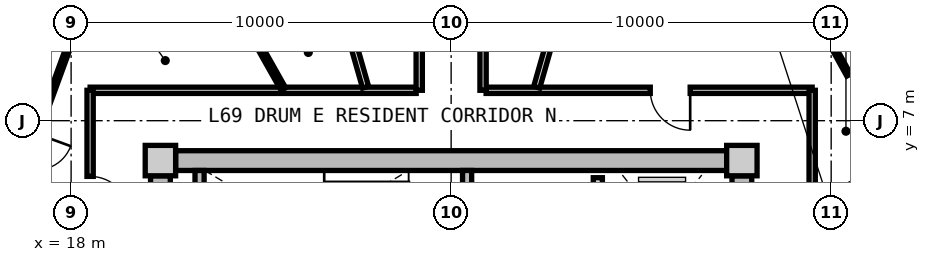
"""IFC4 building model, lengths in metres.
Left out: names, types, materials, properties, quantities, classifications, styles, units other than length and angle.
Written with IfcOpenShell. Run it as: python <this file> out.ifc"""

import sys

from ifc_helpers import new_model, si_unit, direction, frame, frame_2d, origin, origin_2d, place, context, subcontext, project, spatial, rectangle, extrude, source, transform, mapped, element, fill, save


model = new_model("IFC4")
c1 = context("Model", 3, precision=1e-05, world=origin(), true_north=direction((0.0, 1.0)))
c2 = subcontext(c1, "Body", "Model", "MODEL_VIEW")
j1 = project(units=[si_unit("LENGTHUNIT", "METRE"), si_unit("PLANEANGLEUNIT", "RADIAN")], contexts=[c1])
p1 = place(None, origin())
s1 = spatial("IfcSite", under=j1, at=p1, CompositionType="ELEMENT")
p2 = place(p1, origin())
s2 = spatial("IfcBuilding", under=s1, at=p2, CompositionType="ELEMENT")
p3 = place(p2, frame((0.0, 0.0, 223.05)))
s3 = spatial("IfcBuildingStorey", under=s2, at=p3, CompositionType="ELEMENT", Elevation=223.05)
m1 = source(origin(), c2, "Body", "SweptSolid", [
    extrude(rectangle(XDim=0.8, YDim=0.8, at=origin_2d()), origin(), (0.0, 0.0, 1.0), 3.05),
])
for number, where, z_axis, x_axis in (
    (1, (35.65, 5.95, 0.0), (0.0, 0.0, 1.0), (1.0, 0.0, 0.0)),
    (2, (20.35, 5.95, 0.0), (0.0, 0.0, 1.0), (1.0, 0.0, 0.0)),
):
    element("IfcColumn", number, at=place(p3, frame(where, z_axis=z_axis, x_axis=x_axis)), inside=s3, PredefinedType="COLUMN", context=c2, shape_type="MappedRepresentation", body=[
        mapped(m1, transform((0.0, 0.0, 0.0), x_axis=(1.0, 0.0, 0.0), y_axis=(0.0, 1.0, 0.0), z_axis=(0.0, 0.0, 1.0), scale=1.0)),
    ])
m2 = source(origin(), c2, "Body", "SweptSolid", [
    extrude(rectangle(XDim=14.5, YDim=0.52, at=frame_2d((7.25, 0.0))), origin(), (0.0, 0.0, 1.0), 2.76),
])
p4 = place(p3, frame((20.75, 5.95, 0.0), z_axis=(0.0, 0.0, 1.0), x_axis=(1.0, 0.0, 0.0)))
e3 = element("IfcWall", 3, at=p4, inside=s3, PredefinedType="SHEAR", context=c2, shape_type="MappedRepresentation", body=[
    mapped(m2, transform((0.0, 0.0, 0.0), x_axis=(1.0, 0.0, 0.0), y_axis=(0.0, 1.0, 0.0), z_axis=(0.0, 0.0, 1.0), scale=1.0)),
])
m3 = source(origin(), c2, "Body", "SweptSolid", [
    extrude(rectangle(XDim=11.1, YDim=0.52, at=frame_2d((5.55, 0.0))), origin(), (0.0, 0.0, 1.0), 2.76),
])
p5 = place(p3, frame((20.35, -5.55, 0.0), z_axis=(0.0, 0.0, 1.0), x_axis=(0.0, 1.0, 0.0)))
e4 = element("IfcWall", 4, at=p5, inside=s3, PredefinedType="SHEAR", context=c2, shape_type="MappedRepresentation", body=[
    mapped(m3, transform((0.0, 0.0, 0.0), x_axis=(1.0, 0.0, 0.0), y_axis=(0.0, 1.0, 0.0), z_axis=(0.0, 0.0, 1.0), scale=1.0)),
])
p6 = place(p5, frame((3.8, 0.0, 0.0)))
e5 = element("IfcOpeningElement", 5, at=p6, cuts=e4, PredefinedType="OPENING", context=c2, shape_type="SweptSolid", body=[
    extrude(rectangle(XDim=1.2, YDim=2.15, at=frame_2d((0.6, 1.075))), frame((0.0, 0.27, 0.0), z_axis=(0.0, -1.0, 0.0), x_axis=(1.0, 0.0, 0.0)), (0.0, 0.0, 1.0), 0.54),
])
p7 = place(p3, frame((35.65, 5.55, 0.0), z_axis=(0.0, 0.0, 1.0), x_axis=(0.0, -1.0, 0.0)))
e6 = element("IfcWall", 6, at=p7, inside=s3, PredefinedType="SHEAR", context=c2, shape_type="MappedRepresentation", body=[
    mapped(m3, transform((0.0, 0.0, 0.0), x_axis=(1.0, 0.0, 0.0), y_axis=(0.0, 1.0, 0.0), z_axis=(0.0, 0.0, 1.0), scale=1.0)),
])
p8 = place(p7, frame((5.65, 0.0, 0.0)))
e7 = element("IfcOpeningElement", 7, at=p8, cuts=e6, PredefinedType="OPENING", context=c2, shape_type="SweptSolid", body=[
    extrude(rectangle(XDim=1.2, YDim=2.15, at=frame_2d((0.6, 1.075))), frame((0.0, 0.27, 0.0), z_axis=(0.0, -1.0, 0.0), x_axis=(1.0, 0.0, 0.0)), (0.0, 0.0, 1.0), 0.54),
])
m4 = source(origin(), c2, "Body", "SweptSolid", [
    extrude(rectangle(XDim=3.24, YDim=0.24, at=frame_2d((1.62, 0.0))), origin(), (0.0, 0.0, 1.0), 2.76),
])
p9 = place(p3, frame((21.38, 2.45, 0.0), z_axis=(0.0, 0.0, 1.0), x_axis=(0.0, 1.0, 0.0)))
e8 = element("IfcWall", 8, at=p9, inside=s3, PredefinedType="PARTITIONING", context=c2, shape_type="MappedRepresentation", body=[
    mapped(m4, transform((0.0, 0.0, 0.0), x_axis=(1.0, 0.0, 0.0), y_axis=(0.0, 1.0, 0.0), z_axis=(0.0, 0.0, 1.0), scale=1.0)),
])
p10 = place(p3, frame((28.42, 2.45, 0.0), z_axis=(0.0, 0.0, 1.0), x_axis=(0.0, 1.0, 0.0)))
e9 = element("IfcWall", 9, at=p10, inside=s3, PredefinedType="PARTITIONING", context=c2, shape_type="MappedRepresentation", body=[
    mapped(m4, transform((0.0, 0.0, 0.0), x_axis=(1.0, 0.0, 0.0), y_axis=(0.0, 1.0, 0.0), z_axis=(0.0, 0.0, 1.0), scale=1.0)),
])
p11 = place(p10, frame((0.55, 0.0, 0.0)))
e10 = element("IfcOpeningElement", 10, at=p11, cuts=e9, PredefinedType="OPENING", context=c2, shape_type="SweptSolid", body=[
    extrude(rectangle(XDim=1.1, YDim=2.15, at=frame_2d((0.55, 1.075))), frame((0.0, 0.13, 0.0), z_axis=(0.0, -1.0, 0.0), x_axis=(1.0, 0.0, 0.0)), (0.0, 0.0, 1.0), 0.26),
])
m5 = source(origin(), c2, "Body", "SweptSolid", [
    extrude(rectangle(XDim=5.0, YDim=0.24, at=frame_2d((2.5, 0.0))), origin(), (0.0, 0.0, 1.0), 2.745),
])
p12 = place(p3, frame((31.86, 0.5, 0.0), z_axis=(0.0, 0.0, 1.0), x_axis=(0.0, 1.0, 0.0)))
e11 = element("IfcWall", 11, at=p12, inside=s3, PredefinedType="PARTITIONING", context=c2, shape_type="MappedRepresentation", body=[
    mapped(m5, transform((0.0, 0.0, 0.0), x_axis=(1.0, 0.0, 0.0), y_axis=(0.0, 1.0, 0.0), z_axis=(0.0, 0.0, 1.0), scale=1.0)),
])
p13 = place(p12, frame((3.05, 0.0, 0.0)))
e12 = element("IfcOpeningElement", 12, at=p13, cuts=e11, PredefinedType="OPENING", context=c2, shape_type="SweptSolid", body=[
    extrude(rectangle(XDim=1.3, YDim=2.2, at=frame_2d((0.65, 1.1))), frame((0.0, 0.13, 0.0), z_axis=(0.0, -1.0, 0.0), x_axis=(1.0, 0.0, 0.0)), (0.0, 0.0, 1.0), 0.26),
])
p14 = place(p12, frame((0.55, 0.0, 0.0)))
e13 = element("IfcOpeningElement", 13, at=p14, cuts=e11, PredefinedType="OPENING", context=c2, shape_type="SweptSolid", body=[
    extrude(rectangle(XDim=1.3, YDim=2.2, at=frame_2d((0.65, 1.1))), frame((0.0, 0.13, 0.0), z_axis=(0.0, -1.0, 0.0), x_axis=(1.0, 0.0, 0.0)), (0.0, 0.0, 1.0), 0.26),
])
m6 = source(origin(), c2, "Body", "SweptSolid", [
    extrude(rectangle(XDim=8.58, YDim=0.165, at=frame_2d((4.29, 0.0))), origin(), (0.0, 0.0, 1.0), 2.745),
])
p15 = place(p3, frame((18.5, 7.8, 0.0), z_axis=(0.0, 0.0, 1.0), x_axis=(1.0, 0.0, 0.0)))
e14 = element("IfcWall", 14, at=p15, inside=s3, PredefinedType="PARTITIONING", context=c2, shape_type="MappedRepresentation", body=[
    mapped(m6, transform((0.0, 0.0, 0.0), x_axis=(1.0, 0.0, 0.0), y_axis=(0.0, 1.0, 0.0), z_axis=(0.0, 0.0, 1.0), scale=1.0)),
])
p16 = place(p3, frame((28.92, 7.8, 0.0), z_axis=(0.0, 0.0, 1.0), x_axis=(1.0, 0.0, 0.0)))
e15 = element("IfcWall", 15, at=p16, inside=s3, PredefinedType="PARTITIONING", context=c2, shape_type="MappedRepresentation", body=[
    mapped(m6, transform((0.0, 0.0, 0.0), x_axis=(1.0, 0.0, 0.0), y_axis=(0.0, 1.0, 0.0), z_axis=(0.0, 0.0, 1.0), scale=1.0)),
])
p17 = place(p16, frame((4.32, 0.0, 0.0)))
e16 = element("IfcOpeningElement", 16, at=p17, cuts=e15, PredefinedType="OPENING", context=c2, shape_type="SweptSolid", body=[
    extrude(rectangle(XDim=1.05, YDim=2.15, at=frame_2d((0.525, 1.075))), frame((0.0, 0.093, 0.0), z_axis=(0.0, -1.0, 0.0), x_axis=(1.0, 0.0, 0.0)), (0.0, 0.0, 1.0), 0.185),
])
m7 = source(origin(), c2, "Body", "SweptSolid", [
    extrude(rectangle(XDim=6.88, YDim=0.165, at=frame_2d((3.44, 0.0))), origin(), (0.0, 0.0, 1.0), 2.745),
])
p18 = place(p3, frame((18.5, 0.92, 0.0), z_axis=(0.0, 0.0, 1.0), x_axis=(0.0, 1.0, 0.0)))
e17 = element("IfcWall", 17, at=p18, inside=s3, PredefinedType="PARTITIONING", context=c2, shape_type="MappedRepresentation", body=[
    mapped(m7, transform((0.0, 0.0, 0.0), x_axis=(1.0, 0.0, 0.0), y_axis=(0.0, 1.0, 0.0), z_axis=(0.0, 0.0, 1.0), scale=1.0)),
])
p19 = place(p18, frame((3.564, 0.0, 0.0)))
e18 = element("IfcOpeningElement", 18, at=p19, cuts=e17, PredefinedType="OPENING", context=c2, shape_type="SweptSolid", body=[
    extrude(rectangle(XDim=1.05, YDim=2.15, at=frame_2d((0.525, 1.075))), frame((0.0, 0.093, 0.0), z_axis=(0.0, -1.0, 0.0), x_axis=(1.0, 0.0, 0.0)), (0.0, 0.0, 1.0), 0.185),
])
p20 = place(p3, frame((37.5, 7.8, 0.0), z_axis=(0.0, 0.0, 1.0), x_axis=(0.0, -1.0, 0.0)))
e19 = element("IfcWall", 19, at=p20, inside=s3, PredefinedType="PARTITIONING", context=c2, shape_type="MappedRepresentation", body=[
    mapped(m7, transform((0.0, 0.0, 0.0), x_axis=(1.0, 0.0, 0.0), y_axis=(0.0, 1.0, 0.0), z_axis=(0.0, 0.0, 1.0), scale=1.0)),
])
m8 = source(origin(), c2, "Body", "SweptSolid", [
    extrude(rectangle(XDim=6.974, YDim=0.165, at=frame_2d((3.487, 0.0))), origin(), (0.0, 0.0, 1.0), 2.345),
])
for number, where, z_axis, x_axis in (
    (20, (30.251, 7.88, 0.0), (0.0, 0.0, 1.0), (0.275, 0.962, 0.0)),
    (21, (25.749, 7.88, 0.0), (0.0, 0.0, 1.0), (-0.275, 0.962, 0.0)),
):
    element("IfcWall", number, at=place(p3, frame(where, z_axis=z_axis, x_axis=x_axis)), inside=s3, PredefinedType="PARTITIONING", context=c2, shape_type="MappedRepresentation", body=[
        mapped(m8, transform((0.0, 0.0, 0.0), x_axis=(1.0, 0.0, 0.0), y_axis=(0.0, 1.0, 0.0), z_axis=(0.0, 0.0, 1.0), scale=1.0)),
    ])
m9 = source(origin(), c2, "Body", "SweptSolid", [
    extrude(rectangle(XDim=6.835, YDim=0.165, at=frame_2d((3.418, 0.0))), origin(), (0.0, 0.0, 1.0), 2.745),
])
p21 = place(p3, frame((27.16, 7.8, 0.0), z_axis=(0.0, 0.0, 1.0), x_axis=(0.0, 1.0, 0.0)))
e22 = element("IfcWall", 22, at=p21, inside=s3, PredefinedType="PARTITIONING", context=c2, shape_type="MappedRepresentation", body=[
    mapped(m9, transform((0.0, 0.0, 0.0), x_axis=(1.0, 0.0, 0.0), y_axis=(0.0, 1.0, 0.0), z_axis=(0.0, 0.0, 1.0), scale=1.0)),
])
p22 = place(p21, frame((2.943, 0.0, 0.0)))
e23 = element("IfcOpeningElement", 23, at=p22, cuts=e22, PredefinedType="OPENING", context=c2, shape_type="SweptSolid", body=[
    extrude(rectangle(XDim=0.95, YDim=2.1, at=frame_2d((0.475, 1.05))), frame((0.0, 0.093, 0.0), z_axis=(0.0, -1.0, 0.0), x_axis=(1.0, 0.0, 0.0)), (0.0, 0.0, 1.0), 0.185),
])
p23 = place(p3, frame((28.84, 14.635, 0.0), z_axis=(0.0, 0.0, 1.0), x_axis=(0.0, -1.0, 0.0)))
e24 = element("IfcWall", 24, at=p23, inside=s3, PredefinedType="PARTITIONING", context=c2, shape_type="MappedRepresentation", body=[
    mapped(m9, transform((0.0, 0.0, 0.0), x_axis=(1.0, 0.0, 0.0), y_axis=(0.0, 1.0, 0.0), z_axis=(0.0, 0.0, 1.0), scale=1.0)),
])
p24 = place(p23, frame((2.943, 0.0, 0.0)))
e25 = element("IfcOpeningElement", 25, at=p24, cuts=e24, PredefinedType="OPENING", context=c2, shape_type="SweptSolid", body=[
    extrude(rectangle(XDim=0.95, YDim=2.1, at=frame_2d((0.475, 1.05))), frame((0.0, 0.093, 0.0), z_axis=(0.0, -1.0, 0.0), x_axis=(1.0, 0.0, 0.0)), (0.0, 0.0, 1.0), 0.185),
])
m10 = source(origin(), c2, "Body", "SweptSolid", [
    extrude(rectangle(XDim=1.638, YDim=0.14, at=frame_2d((0.819, 0.0))), origin(), (0.0, 0.0, 1.0), 2.745),
])
p25 = place(p3, frame((37.53, 4.778, 0.0), z_axis=(0.0, 0.0, 1.0), x_axis=(0.893919977945, 0.448226586707, 0.0)))
e26 = element("IfcWall", 26, at=p25, inside=s3, PredefinedType="PARTITIONING", context=c2, shape_type="MappedRepresentation", body=[
    mapped(m10, transform((0.0, 0.0, 0.0), x_axis=(1.0, 0.0, 0.0), y_axis=(0.0, 1.0, 0.0), z_axis=(0.0, 0.0, 1.0), scale=1.0)),
])
m11 = source(origin(), c2, "Body", "SweptSolid", [
    extrude(rectangle(XDim=3.45, YDim=0.115, at=frame_2d((1.725, 0.0))), origin(), (0.0, 0.0, 1.0), 2.745),
])
p26 = place(p3, frame((39.525, 6.275, 0.0), z_axis=(0.0, 0.0, 1.0), x_axis=(-0.483659007882, 0.875256513312, 0.0)))
e27 = element("IfcWall", 27, at=p26, inside=s3, PredefinedType="PARTITIONING", context=c2, shape_type="MappedRepresentation", body=[
    mapped(m11, transform((0.0, 0.0, 0.0), x_axis=(1.0, 0.0, 0.0), y_axis=(0.0, 1.0, 0.0), z_axis=(0.0, 0.0, 1.0), scale=1.0)),
])
p27 = place(p26, frame((1.25, 0.0, 0.0)))
e28 = element("IfcOpeningElement", 28, at=p27, cuts=e27, PredefinedType="OPENING", context=c2, shape_type="SweptSolid", body=[
    extrude(rectangle(XDim=0.95, YDim=2.1, at=frame_2d((0.475, 1.05))), frame((0.0, 0.067, 0.0), z_axis=(0.0, -1.0, 0.0), x_axis=(1.0, 0.0, 0.0)), (0.0, 0.0, 1.0), 0.135),
])
m12 = source(origin(), c2, "Body", "SweptSolid", [
    extrude(rectangle(XDim=6.69, YDim=0.115, at=frame_2d((3.345, 0.0))), origin(), (0.0, 0.0, 1.0), 2.745),
])
p28 = place(p3, frame((18.083, 9.352, 0.0), z_axis=(0.0, 0.0, 1.0), x_axis=(-0.343693784919, -0.939081776102, 0.0)))
e29 = element("IfcWall", 29, at=p28, inside=s3, PredefinedType="PARTITIONING", context=c2, shape_type="MappedRepresentation", body=[
    mapped(m12, transform((0.0, 0.0, 0.0), x_axis=(1.0, 0.0, 0.0), y_axis=(0.0, 1.0, 0.0), z_axis=(0.0, 0.0, 1.0), scale=1.0)),
])
p29 = place(p28, frame((2.87, 0.0, 0.0)))
e30 = element("IfcOpeningElement", 30, at=p29, cuts=e29, PredefinedType="OPENING", context=c2, shape_type="SweptSolid", body=[
    extrude(rectangle(XDim=0.95, YDim=2.1, at=frame_2d((0.475, 1.05))), frame((0.0, 0.067, 0.0), z_axis=(0.0, -1.0, 0.0), x_axis=(1.0, 0.0, 0.0)), (0.0, 0.0, 1.0), 0.135),
])
m13 = source(origin(), c2, "Body", "SweptSolid", [
    extrude(rectangle(XDim=2.035, YDim=0.14, at=frame_2d((1.018, 0.0))), origin(), (0.0, 0.0, 1.0), 2.745),
])
p30 = place(p3, frame((23.585, 7.83, 0.0), z_axis=(0.0, 0.0, 1.0), x_axis=(-0.491092509169, 0.871107425888, 0.0)))
e31 = element("IfcWall", 31, at=p30, inside=s3, PredefinedType="PARTITIONING", context=c2, shape_type="MappedRepresentation", body=[
    mapped(m13, transform((0.0, 0.0, 0.0), x_axis=(1.0, 0.0, 0.0), y_axis=(0.0, 1.0, 0.0), z_axis=(0.0, 0.0, 1.0), scale=1.0)),
])
m14 = source(origin(), c2, "Body", "SweptSolid", [
    extrude(rectangle(XDim=1.05, YDim=2.15, at=frame_2d((0.525, 1.075))), frame((0.0, 0.025, 0.0), z_axis=(0.0, -1.0, 0.0), x_axis=(1.0, 0.0, 0.0)), (0.0, 0.0, 1.0), 0.05),
])
p31 = place(p17, frame((1.05, 0.0, 0.0), z_axis=(0.0, 0.0, 1.0), x_axis=(-1.0, 0.0, 0.0)))
e32 = element("IfcDoor", 32, at=p31, inside=s3, OperationType="SINGLE_SWING_LEFT", PredefinedType="DOOR", context=c2, shape_type="MappedRepresentation", body=[
    mapped(m14, transform((0.0, 0.0, 0.0), x_axis=(1.0, 0.0, 0.0), y_axis=(0.0, 1.0, 0.0), z_axis=(0.0, 0.0, 1.0), scale=1.0)),
])
fill(e16, e32)
m15 = source(origin(), c2, "Body", "SweptSolid", [
    extrude(rectangle(XDim=0.95, YDim=2.1, at=frame_2d((0.475, 1.05))), frame((0.0, 0.025, 0.0), z_axis=(0.0, -1.0, 0.0), x_axis=(1.0, 0.0, 0.0)), (0.0, 0.0, 1.0), 0.05),
])
p32 = place(p27, frame((0.95, 0.0, 0.0), z_axis=(0.0, 0.0, 1.0), x_axis=(-1.0, 0.0, 0.0)))
e33 = element("IfcDoor", 33, at=p32, inside=s3, OperationType="SINGLE_SWING_LEFT", PredefinedType="DOOR", context=c2, shape_type="MappedRepresentation", body=[
    mapped(m15, transform((0.0, 0.0, 0.0), x_axis=(1.0, 0.0, 0.0), y_axis=(0.0, 1.0, 0.0), z_axis=(0.0, 0.0, 1.0), scale=1.0)),
])
fill(e28, e33)
p33 = place(p19, frame((1.05, 0.0, 0.0), z_axis=(0.0, 0.0, 1.0), x_axis=(-1.0, 0.0, 0.0)))
e34 = element("IfcDoor", 34, at=p33, inside=s3, OperationType="SINGLE_SWING_RIGHT", PredefinedType="DOOR", context=c2, shape_type="MappedRepresentation", body=[
    mapped(m14, transform((0.0, 0.0, 0.0), x_axis=(1.0, 0.0, 0.0), y_axis=(0.0, 1.0, 0.0), z_axis=(0.0, 0.0, 1.0), scale=1.0)),
])
fill(e18, e34)
save(model, sys.argv[1])
